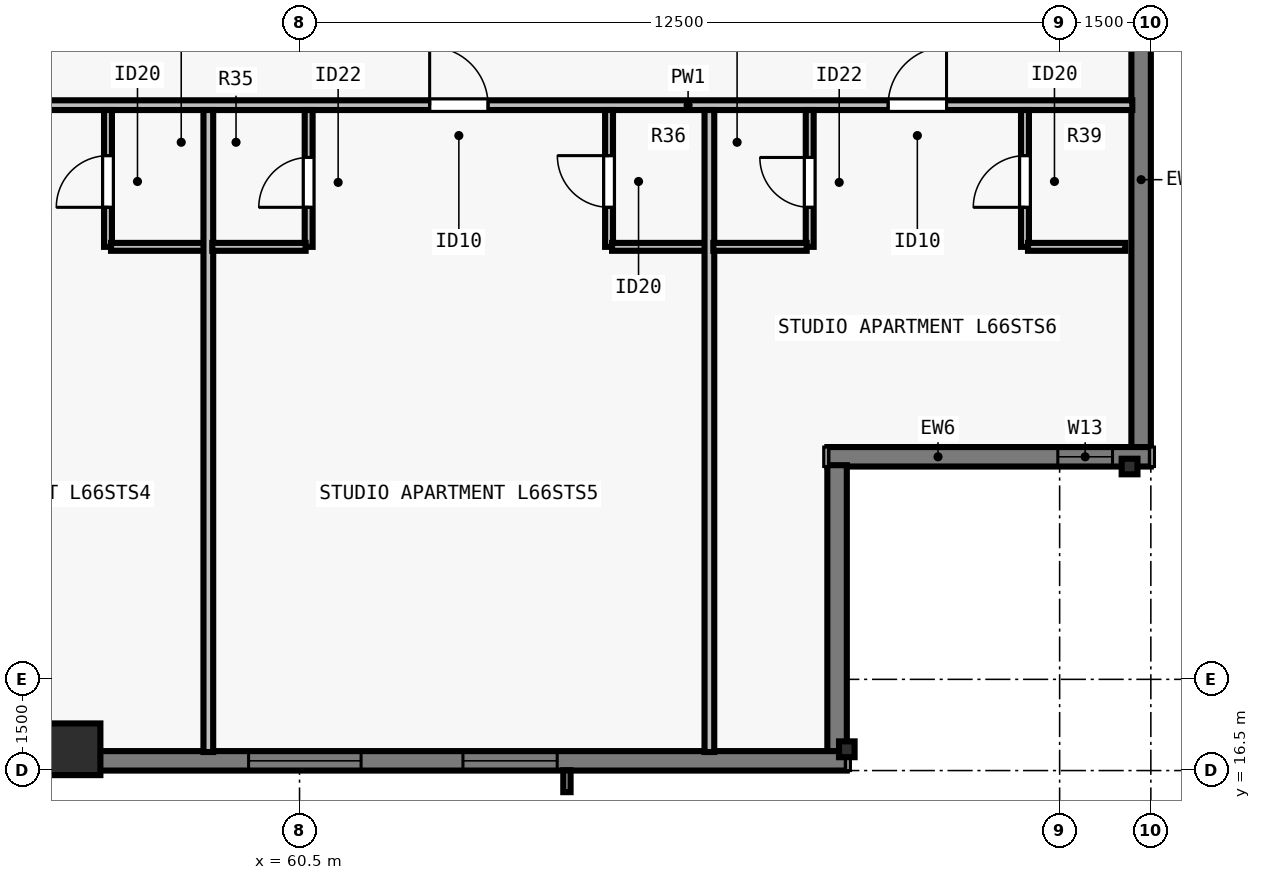
"""IFC4 building model, lengths in metres.
Left out: names, types, materials, properties, quantities, classifications, styles, units other than length and angle.
Written with IfcOpenShell. Run it as: python <this file> out.ifc"""

import sys

from ifc_helpers import new_model, si_unit, direction, frame, frame_2d, origin, origin_2d, place, context, subcontext, project, spatial, rectangle, i_section, extrude, element, fill, save


model = new_model("IFC4")
c1 = context("Model", 3, precision=1e-05, world=origin(), true_north=direction((0.0, 1.0)))
c2 = subcontext(c1, "Body", "Model", "MODEL_VIEW")
j1 = project(units=[si_unit("LENGTHUNIT", "METRE"), si_unit("PLANEANGLEUNIT", "RADIAN")], contexts=[c1])
p1 = place(None, origin())
s1 = spatial("IfcSite", under=j1, at=p1, CompositionType="ELEMENT")
p2 = place(p1, origin())
s2 = spatial("IfcBuilding", under=s1, at=p2, CompositionType="ELEMENT")
p3 = place(p2, frame((0.0, 0.0, 241.0)))
s3 = spatial("IfcBuildingStorey", under=s2, at=p3, CompositionType="ELEMENT", Elevation=241.0)
p4 = place(p3, frame((56.8, 16.85, 0.0), z_axis=(0.0, 0.0, 1.0), x_axis=(1.0, 0.0, 0.0)))
e1 = element("IfcColumn", 1, at=p4, inside=s3, PredefinedType="COLUMN", context=c2, shape_type="SweptSolid", body=[
    extrude(rectangle(XDim=0.85, YDim=0.85, at=origin_2d()), origin(), (0.0, 0.0, 1.0), 3.5),
])
for number, where, z_axis, x_axis in (
    (2, (69.5, 16.85, 0.0), (0.0, 0.0, 1.0), (1.0, 0.0, 0.0)),
    (3, (74.15, 21.5, 0.0), (0.0, 0.0, 1.0), (0.0, 1.0, 0.0)),
):
    element("IfcColumn", number, at=place(p3, frame(where, z_axis=z_axis, x_axis=x_axis)), inside=s3, PredefinedType="COLUMN", context=c2, shape_type="SweptSolid", body=[
        extrude(i_section(OverallWidth=0.256, OverallDepth=0.26, WebThickness=0.01, FlangeThickness=0.017, FilletRadius=0.013, at=origin_2d()), origin(), (0.0, 0.0, 1.0), 3.5),
    ])
p5 = place(p3, frame((74.34, 56.5, 0.0), z_axis=(0.0, 0.0, 1.0), x_axis=(0.0, -1.0, 0.0)))
e4 = element("IfcWall", 4, at=p5, inside=s3, PredefinedType="SOLIDWALL", context=c2, shape_type="SweptSolid", body=[
    extrude(rectangle(XDim=34.702, YDim=0.32, at=frame_2d((17.351, 0.0))), origin(), (0.0, 0.0, 1.0), 3.29),
])
p6 = place(p5, frame((3.913, 0.0, 0.8)))
e5 = element("IfcOpeningElement", 5, at=p6, cuts=e4, PredefinedType="OPENING", context=c2, shape_type="SweptSolid", body=[
    extrude(rectangle(XDim=1.55, YDim=1.678, at=frame_2d((0.775, 0.839))), frame((0.0, 0.17, 0.0), z_axis=(0.0, -1.0, 0.0), x_axis=(1.0, 0.0, 0.0)), (0.0, 0.0, 1.0), 0.34),
])
p7 = place(p5, frame((6.738, 0.0, 0.8)))
e6 = element("IfcOpeningElement", 6, at=p7, cuts=e4, PredefinedType="OPENING", context=c2, shape_type="SweptSolid", body=[
    extrude(rectangle(XDim=1.85, YDim=1.678, at=frame_2d((0.925, 0.839))), frame((0.0, 0.17, 0.0), z_axis=(0.0, -1.0, 0.0), x_axis=(1.0, 0.0, 0.0)), (0.0, 0.0, 1.0), 0.34),
])
p8 = place(p5, frame((10.263, 0.0, 0.8)))
e7 = element("IfcOpeningElement", 7, at=p8, cuts=e4, PredefinedType="OPENING", context=c2, shape_type="SweptSolid", body=[
    extrude(rectangle(XDim=1.55, YDim=1.678, at=frame_2d((0.775, 0.839))), frame((0.0, 0.17, 0.0), z_axis=(0.0, -1.0, 0.0), x_axis=(1.0, 0.0, 0.0)), (0.0, 0.0, 1.0), 0.34),
])
p9 = place(p5, frame((14.738, 0.0, 0.8)))
e8 = element("IfcOpeningElement", 8, at=p9, cuts=e4, PredefinedType="OPENING", context=c2, shape_type="SweptSolid", body=[
    extrude(rectangle(XDim=1.85, YDim=1.678, at=frame_2d((0.925, 0.839))), frame((0.0, 0.17, 0.0), z_axis=(0.0, -1.0, 0.0), x_axis=(1.0, 0.0, 0.0)), (0.0, 0.0, 1.0), 0.34),
])
p10 = place(p5, frame((18.264, 0.0, 0.8)))
e9 = element("IfcOpeningElement", 9, at=p10, cuts=e4, PredefinedType="OPENING", context=c2, shape_type="SweptSolid", body=[
    extrude(rectangle(XDim=1.55, YDim=1.678, at=frame_2d((0.775, 0.839))), frame((0.0, 0.17, 0.0), z_axis=(0.0, -1.0, 0.0), x_axis=(1.0, 0.0, 0.0)), (0.0, 0.0, 1.0), 0.34),
])
p11 = place(p5, frame((24.164, 0.0, 0.8)))
e10 = element("IfcOpeningElement", 10, at=p11, cuts=e4, PredefinedType="OPENING", context=c2, shape_type="SweptSolid", body=[
    extrude(rectangle(XDim=1.55, YDim=1.678, at=frame_2d((0.775, 0.839))), frame((0.0, 0.17, 0.0), z_axis=(0.0, -1.0, 0.0), x_axis=(1.0, 0.0, 0.0)), (0.0, 0.0, 1.0), 0.34),
])
p12 = place(p3, frame((74.5, 21.66, 0.0), z_axis=(0.0, 0.0, 1.0), x_axis=(-1.0, 0.0, 0.0)))
e11 = element("IfcWall", 11, at=p12, inside=s3, PredefinedType="SOLIDWALL", context=c2, shape_type="SweptSolid", body=[
    extrude(rectangle(XDim=5.32, YDim=0.32, at=frame_2d((2.66, 0.0))), origin(), (0.0, 0.0, 1.0), 3.29),
])
p13 = place(p12, frame((0.63, 0.0, 0.8)))
e12 = element("IfcOpeningElement", 12, at=p13, cuts=e11, PredefinedType="OPENING", context=c2, shape_type="SweptSolid", body=[
    extrude(rectangle(XDim=0.9, YDim=1.678, at=frame_2d((0.45, 0.839))), frame((0.0, 0.17, 0.0), z_axis=(0.0, -1.0, 0.0), x_axis=(1.0, 0.0, 0.0)), (0.0, 0.0, 1.0), 0.34),
])
p14 = place(p3, frame((69.34, 21.522, 0.0), z_axis=(0.0, 0.0, 1.0), x_axis=(0.0, -1.0, 0.0)))
e13 = element("IfcWall", 13, at=p14, inside=s3, PredefinedType="SOLIDWALL", context=c2, shape_type="SweptSolid", body=[
    extrude(rectangle(XDim=4.724, YDim=0.32, at=frame_2d((2.362, 0.0))), origin(), (0.0, 0.0, 1.0), 3.29),
])
p15 = place(p3, frame((69.5, 16.66, 0.0), z_axis=(0.0, 0.0, 1.0), x_axis=(-1.0, 0.0, 0.0)))
e14 = element("IfcWall", 14, at=p15, inside=s3, PredefinedType="SOLIDWALL", context=c2, shape_type="SweptSolid", body=[
    extrude(rectangle(XDim=34.702, YDim=0.32, at=frame_2d((17.351, 0.0))), origin(), (0.0, 0.0, 1.0), 3.29),
])
p16 = place(p15, frame((4.763, 0.0, 0.8)))
e15 = element("IfcOpeningElement", 15, at=p16, cuts=e14, PredefinedType="OPENING", context=c2, shape_type="SweptSolid", body=[
    extrude(rectangle(XDim=1.55, YDim=1.678, at=frame_2d((0.775, 0.839))), frame((0.0, 0.17, 0.0), z_axis=(0.0, -1.0, 0.0), x_axis=(1.0, 0.0, 0.0)), (0.0, 0.0, 1.0), 0.34),
])
p17 = place(p15, frame((7.988, 0.0, 0.8)))
e16 = element("IfcOpeningElement", 16, at=p17, cuts=e14, PredefinedType="OPENING", context=c2, shape_type="SweptSolid", body=[
    extrude(rectangle(XDim=1.85, YDim=1.678, at=frame_2d((0.925, 0.839))), frame((0.0, 0.17, 0.0), z_axis=(0.0, -1.0, 0.0), x_axis=(1.0, 0.0, 0.0)), (0.0, 0.0, 1.0), 0.34),
])
p18 = place(p15, frame((14.738, 0.0, 0.8)))
e17 = element("IfcOpeningElement", 17, at=p18, cuts=e14, PredefinedType="OPENING", context=c2, shape_type="SweptSolid", body=[
    extrude(rectangle(XDim=1.85, YDim=1.678, at=frame_2d((0.925, 0.839))), frame((0.0, 0.17, 0.0), z_axis=(0.0, -1.0, 0.0), x_axis=(1.0, 0.0, 0.0)), (0.0, 0.0, 1.0), 0.34),
])
p19 = place(p15, frame((18.264, 0.0, 0.8)))
e18 = element("IfcOpeningElement", 18, at=p19, cuts=e14, PredefinedType="OPENING", context=c2, shape_type="SweptSolid", body=[
    extrude(rectangle(XDim=1.55, YDim=1.678, at=frame_2d((0.775, 0.839))), frame((0.0, 0.17, 0.0), z_axis=(0.0, -1.0, 0.0), x_axis=(1.0, 0.0, 0.0)), (0.0, 0.0, 1.0), 0.34),
])
p20 = place(p15, frame((25.864, 0.0, 0.8)))
e19 = element("IfcOpeningElement", 19, at=p20, cuts=e14, PredefinedType="OPENING", context=c2, shape_type="SweptSolid", body=[
    extrude(rectangle(XDim=1.55, YDim=1.678, at=frame_2d((0.775, 0.839))), frame((0.0, 0.17, 0.0), z_axis=(0.0, -1.0, 0.0), x_axis=(1.0, 0.0, 0.0)), (0.0, 0.0, 1.0), 0.34),
])
p21 = place(p15, frame((28.24, 0.0, 0.8)))
e20 = element("IfcOpeningElement", 20, at=p21, cuts=e14, PredefinedType="OPENING", context=c2, shape_type="SweptSolid", body=[
    extrude(rectangle(XDim=1.85, YDim=1.678, at=frame_2d((0.925, 0.839))), frame((0.0, 0.17, 0.0), z_axis=(0.0, -1.0, 0.0), x_axis=(1.0, 0.0, 0.0)), (0.0, 0.0, 1.0), 0.34),
])
p22 = place(p3, frame((29.805, 27.442, 0.0), z_axis=(0.0, 0.0, 1.0), x_axis=(1.0, 0.0, 0.0)))
e21 = element("IfcWall", 21, at=p22, inside=s3, PredefinedType="PARTITIONING", context=c2, shape_type="SweptSolid", body=[
    extrude(rectangle(XDim=44.39, YDim=0.16, at=frame_2d((22.195, 0.0))), origin(), (0.0, 0.0, 1.0), 2.958),
])
p23 = place(p22, frame((3.575, 0.0, 0.0)))
e22 = element("IfcOpeningElement", 22, at=p23, cuts=e21, PredefinedType="OPENING", context=c2, shape_type="SweptSolid", body=[
    extrude(rectangle(XDim=0.96, YDim=2.18, at=frame_2d((0.48, 1.09))), frame((0.0, 0.09, 0.0), z_axis=(0.0, -1.0, 0.0), x_axis=(1.0, 0.0, 0.0)), (0.0, 0.0, 1.0), 0.18),
])
p24 = place(p22, frame((10.755, 0.0, 0.0)))
e23 = element("IfcOpeningElement", 23, at=p24, cuts=e21, PredefinedType="OPENING", context=c2, shape_type="SweptSolid", body=[
    extrude(rectangle(XDim=0.96, YDim=2.18, at=frame_2d((0.48, 1.09))), frame((0.0, 0.09, 0.0), z_axis=(0.0, -1.0, 0.0), x_axis=(1.0, 0.0, 0.0)), (0.0, 0.0, 1.0), 0.18),
])
p25 = place(p22, frame((18.115, 0.0, 0.0)))
e24 = element("IfcOpeningElement", 24, at=p25, cuts=e21, PredefinedType="OPENING", context=c2, shape_type="SweptSolid", body=[
    extrude(rectangle(XDim=0.96, YDim=2.18, at=frame_2d((0.48, 1.09))), frame((0.0, 0.09, 0.0), z_axis=(0.0, -1.0, 0.0), x_axis=(1.0, 0.0, 0.0)), (0.0, 0.0, 1.0), 0.18),
])
p26 = place(p22, frame((25.475, 0.0, 0.0)))
e25 = element("IfcOpeningElement", 25, at=p26, cuts=e21, PredefinedType="OPENING", context=c2, shape_type="SweptSolid", body=[
    extrude(rectangle(XDim=0.96, YDim=2.18, at=frame_2d((0.48, 1.09))), frame((0.0, 0.09, 0.0), z_axis=(0.0, -1.0, 0.0), x_axis=(1.0, 0.0, 0.0)), (0.0, 0.0, 1.0), 0.18),
])
p27 = place(p22, frame((32.835, 0.0, 0.0)))
e26 = element("IfcOpeningElement", 26, at=p27, cuts=e21, PredefinedType="OPENING", context=c2, shape_type="SweptSolid", body=[
    extrude(rectangle(XDim=0.96, YDim=2.18, at=frame_2d((0.48, 1.09))), frame((0.0, 0.09, 0.0), z_axis=(0.0, -1.0, 0.0), x_axis=(1.0, 0.0, 0.0)), (0.0, 0.0, 1.0), 0.18),
])
p28 = place(p22, frame((40.375, 0.0, 0.0)))
e27 = element("IfcOpeningElement", 27, at=p28, cuts=e21, PredefinedType="OPENING", context=c2, shape_type="SweptSolid", body=[
    extrude(rectangle(XDim=0.96, YDim=2.18, at=frame_2d((0.48, 1.09))), frame((0.0, 0.09, 0.0), z_axis=(0.0, -1.0, 0.0), x_axis=(1.0, 0.0, 0.0)), (0.0, 0.0, 1.0), 0.18),
])
p29 = place(p3, frame((57.35, 25.113, 0.0), z_axis=(0.0, 0.0, 1.0), x_axis=(0.0, 1.0, 0.0)))
e28 = element("IfcWall", 28, at=p29, inside=s3, PredefinedType="PLUMBINGWALL", context=c2, shape_type="SweptSolid", body=[
    extrude(rectangle(XDim=2.25, YDim=0.13, at=frame_2d((1.125, 0.0))), origin(), (0.0, 0.0, 1.0), 3.29),
])
p30 = place(p29, frame((0.65, 0.0, 0.0)))
e29 = element("IfcOpeningElement", 29, at=p30, cuts=e28, PredefinedType="OPENING", context=c2, shape_type="SweptSolid", body=[
    extrude(rectangle(XDim=0.85, YDim=2.1, at=frame_2d((0.425, 1.05))), frame((0.0, 0.075, 0.0), z_axis=(0.0, -1.0, 0.0), x_axis=(1.0, 0.0, 0.0)), (0.0, 0.0, 1.0), 0.15),
])
p31 = place(p3, frame((57.4, 25.113, 0.0), z_axis=(0.0, 0.0, 1.0), x_axis=(1.0, 0.0, 0.0)))
e30 = element("IfcWall", 30, at=p31, inside=s3, PredefinedType="PLUMBINGWALL", context=c2, shape_type="SweptSolid", body=[
    extrude(rectangle(XDim=1.6, YDim=0.13, at=frame_2d((0.8, 0.0))), origin(), (0.0, 0.0, 1.0), 3.29),
])
p32 = place(p3, frame((59.0, 16.805, 0.0), z_axis=(0.0, 0.0, 1.0), x_axis=(0.0, 1.0, 0.0)))
e31 = element("IfcWall", 31, at=p32, inside=s3, PredefinedType="PARTITIONING", context=c2, shape_type="SweptSolid", body=[
    extrude(rectangle(XDim=10.558, YDim=0.16, at=frame_2d((5.279, 0.0))), origin(), (0.0, 0.0, 1.0), 3.29),
])
p33 = place(p3, frame((60.65, 25.113, 0.0), z_axis=(0.0, 0.0, 1.0), x_axis=(0.0, 1.0, 0.0)))
e32 = element("IfcWall", 32, at=p33, inside=s3, PredefinedType="PLUMBINGWALL", context=c2, shape_type="SweptSolid", body=[
    extrude(rectangle(XDim=2.25, YDim=0.13, at=frame_2d((1.125, 0.0))), origin(), (0.0, 0.0, 1.0), 3.29),
])
p34 = place(p33, frame((0.65, 0.0, 0.0)))
e33 = element("IfcOpeningElement", 33, at=p34, cuts=e32, PredefinedType="OPENING", context=c2, shape_type="SweptSolid", body=[
    extrude(rectangle(XDim=0.82, YDim=2.1, at=frame_2d((0.41, 1.05))), frame((0.0, 0.075, 0.0), z_axis=(0.0, -1.0, 0.0), x_axis=(1.0, 0.0, 0.0)), (0.0, 0.0, 1.0), 0.15),
])
p35 = place(p3, frame((59.065, 25.113, 0.0), z_axis=(0.0, 0.0, 1.0), x_axis=(1.0, 0.0, 0.0)))
e34 = element("IfcWall", 34, at=p35, inside=s3, PredefinedType="PLUMBINGWALL", context=c2, shape_type="SweptSolid", body=[
    extrude(rectangle(XDim=1.535, YDim=0.13, at=frame_2d((0.768, 0.0))), origin(), (0.0, 0.0, 1.0), 3.29),
])
p36 = place(p3, frame((65.59, 25.113, 0.0), z_axis=(0.0, 0.0, 1.0), x_axis=(0.0, 1.0, 0.0)))
e35 = element("IfcWall", 35, at=p36, inside=s3, PredefinedType="PLUMBINGWALL", context=c2, shape_type="SweptSolid", body=[
    extrude(rectangle(XDim=2.25, YDim=0.13, at=frame_2d((1.125, 0.0))), origin(), (0.0, 0.0, 1.0), 3.29),
])
p37 = place(p36, frame((0.65, 0.0, 0.0)))
e36 = element("IfcOpeningElement", 36, at=p37, cuts=e35, PredefinedType="OPENING", context=c2, shape_type="SweptSolid", body=[
    extrude(rectangle(XDim=0.85, YDim=2.1, at=frame_2d((0.425, 1.05))), frame((0.0, 0.075, 0.0), z_axis=(0.0, -1.0, 0.0), x_axis=(1.0, 0.0, 0.0)), (0.0, 0.0, 1.0), 0.15),
])
p38 = place(p3, frame((65.64, 25.113, 0.0), z_axis=(0.0, 0.0, 1.0), x_axis=(1.0, 0.0, 0.0)))
e37 = element("IfcWall", 37, at=p38, inside=s3, PredefinedType="PLUMBINGWALL", context=c2, shape_type="SweptSolid", body=[
    extrude(rectangle(XDim=1.6, YDim=0.13, at=frame_2d((0.8, 0.0))), origin(), (0.0, 0.0, 1.0), 3.29),
])
p39 = place(p3, frame((67.24, 16.805, 0.0), z_axis=(0.0, 0.0, 1.0), x_axis=(0.0, 1.0, 0.0)))
e38 = element("IfcWall", 38, at=p39, inside=s3, PredefinedType="PARTITIONING", context=c2, shape_type="SweptSolid", body=[
    extrude(rectangle(XDim=10.558, YDim=0.16, at=frame_2d((5.279, 0.0))), origin(), (0.0, 0.0, 1.0), 2.573),
])
p40 = place(p3, frame((68.89, 25.113, 0.0), z_axis=(0.0, 0.0, 1.0), x_axis=(0.0, 1.0, 0.0)))
e39 = element("IfcWall", 39, at=p40, inside=s3, PredefinedType="PLUMBINGWALL", context=c2, shape_type="SweptSolid", body=[
    extrude(rectangle(XDim=2.25, YDim=0.13, at=frame_2d((1.125, 0.0))), origin(), (0.0, 0.0, 1.0), 3.29),
])
p41 = place(p40, frame((0.65, 0.0, 0.0)))
e40 = element("IfcOpeningElement", 40, at=p41, cuts=e39, PredefinedType="OPENING", context=c2, shape_type="SweptSolid", body=[
    extrude(rectangle(XDim=0.82, YDim=2.1, at=frame_2d((0.41, 1.05))), frame((0.0, 0.075, 0.0), z_axis=(0.0, -1.0, 0.0), x_axis=(1.0, 0.0, 0.0)), (0.0, 0.0, 1.0), 0.15),
])
p42 = place(p3, frame((67.305, 25.113, 0.0), z_axis=(0.0, 0.0, 1.0), x_axis=(1.0, 0.0, 0.0)))
e41 = element("IfcWall", 41, at=p42, inside=s3, PredefinedType="PLUMBINGWALL", context=c2, shape_type="SweptSolid", body=[
    extrude(rectangle(XDim=1.535, YDim=0.13, at=frame_2d((0.768, 0.0))), origin(), (0.0, 0.0, 1.0), 2.958),
])
p43 = place(p3, frame((72.43, 25.113, 0.0), z_axis=(0.0, 0.0, 1.0), x_axis=(0.0, 1.0, 0.0)))
e42 = element("IfcWall", 42, at=p43, inside=s3, PredefinedType="PLUMBINGWALL", context=c2, shape_type="SweptSolid", body=[
    extrude(rectangle(XDim=2.25, YDim=0.13, at=frame_2d((1.125, 0.0))), origin(), (0.0, 0.0, 1.0), 3.29),
])
p44 = place(p43, frame((0.65, 0.0, 0.0)))
e43 = element("IfcOpeningElement", 43, at=p44, cuts=e42, PredefinedType="OPENING", context=c2, shape_type="SweptSolid", body=[
    extrude(rectangle(XDim=0.85, YDim=2.1, at=frame_2d((0.425, 1.05))), frame((0.0, 0.075, 0.0), z_axis=(0.0, -1.0, 0.0), x_axis=(1.0, 0.0, 0.0)), (0.0, 0.0, 1.0), 0.15),
])
p45 = place(p3, frame((72.48, 25.113, 0.0), z_axis=(0.0, 0.0, 1.0), x_axis=(1.0, 0.0, 0.0)))
e44 = element("IfcWall", 44, at=p45, inside=s3, PredefinedType="PLUMBINGWALL", context=c2, shape_type="SweptSolid", body=[
    extrude(rectangle(XDim=1.6, YDim=0.13, at=frame_2d((0.8, 0.0))), origin(), (0.0, 0.0, 1.0), 3.29),
])
p46 = place(p16, origin())
e45 = element("IfcWindow", 45, at=p46, inside=s3, PartitioningType="SINGLE_PANEL", PredefinedType="WINDOW", context=c2, shape_type="SweptSolid", body=[
    extrude(rectangle(XDim=1.55, YDim=1.678, at=frame_2d((0.775, 0.839))), frame((0.0, -0.05, 0.0), z_axis=(0.0, -1.0, 0.0), x_axis=(1.0, 0.0, 0.0)), (0.0, 0.0, 1.0), 0.06),
])
fill(e15, e45)
p47 = place(p17, origin())
e46 = element("IfcWindow", 46, at=p47, inside=s3, PartitioningType="SINGLE_PANEL", PredefinedType="WINDOW", context=c2, shape_type="SweptSolid", body=[
    extrude(rectangle(XDim=1.85, YDim=1.678, at=frame_2d((0.925, 0.839))), frame((0.0, -0.05, 0.0), z_axis=(0.0, -1.0, 0.0), x_axis=(1.0, 0.0, 0.0)), (0.0, 0.0, 1.0), 0.06),
])
fill(e16, e46)
p48 = place(p13, origin())
e47 = element("IfcWindow", 47, at=p48, inside=s3, PartitioningType="SINGLE_PANEL", PredefinedType="WINDOW", context=c2, shape_type="SweptSolid", body=[
    extrude(rectangle(XDim=0.9, YDim=1.678, at=frame_2d((0.45, 0.839))), frame((0.0, -0.04, 0.0), z_axis=(0.0, -1.0, 0.0), x_axis=(1.0, 0.0, 0.0)), (0.0, 0.0, 1.0), 0.06),
])
fill(e12, e47)
p49 = place(p30, origin())
e48 = element("IfcDoor", 48, at=p49, inside=s3, OperationType="SINGLE_SWING_LEFT", PredefinedType="DOOR", context=c2, shape_type="SweptSolid", body=[
    extrude(rectangle(XDim=0.85, YDim=2.1, at=frame_2d((0.425, 1.05))), frame((0.0, 0.025, 0.0), z_axis=(0.0, -1.0, 0.0), x_axis=(1.0, 0.0, 0.0)), (0.0, 0.0, 1.0), 0.05),
])
fill(e29, e48)
p50 = place(p34, origin())
e49 = element("IfcDoor", 49, at=p50, inside=s3, OperationType="SINGLE_SWING_LEFT", PredefinedType="DOOR", context=c2, shape_type="SweptSolid", body=[
    extrude(rectangle(XDim=0.82, YDim=2.1, at=frame_2d((0.41, 1.05))), frame((0.0, 0.025, 0.0), z_axis=(0.0, -1.0, 0.0), x_axis=(1.0, 0.0, 0.0)), (0.0, 0.0, 1.0), 0.05),
])
fill(e33, e49)
p51 = place(p37, origin())
e50 = element("IfcDoor", 50, at=p51, inside=s3, OperationType="SINGLE_SWING_RIGHT", PredefinedType="DOOR", context=c2, shape_type="SweptSolid", body=[
    extrude(rectangle(XDim=0.85, YDim=2.1, at=frame_2d((0.425, 1.05))), frame((0.0, 0.025, 0.0), z_axis=(0.0, -1.0, 0.0), x_axis=(1.0, 0.0, 0.0)), (0.0, 0.0, 1.0), 0.05),
])
fill(e36, e50)
p52 = place(p27, origin())
e51 = element("IfcDoor", 51, at=p52, inside=s3, OperationType="SINGLE_SWING_LEFT", PredefinedType="DOOR", context=c2, shape_type="SweptSolid", body=[
    extrude(rectangle(XDim=0.96, YDim=2.18, at=frame_2d((0.48, 1.09))), frame((0.0, 0.025, 0.0), z_axis=(0.0, -1.0, 0.0), x_axis=(1.0, 0.0, 0.0)), (0.0, 0.0, 1.0), 0.05),
])
fill(e26, e51)
p53 = place(p41, origin())
e52 = element("IfcDoor", 52, at=p53, inside=s3, OperationType="SINGLE_SWING_RIGHT", PredefinedType="DOOR", context=c2, shape_type="SweptSolid", body=[
    extrude(rectangle(XDim=0.82, YDim=2.1, at=frame_2d((0.41, 1.05))), frame((0.0, 0.025, 0.0), z_axis=(0.0, -1.0, 0.0), x_axis=(1.0, 0.0, 0.0)), (0.0, 0.0, 1.0), 0.05),
])
fill(e40, e52)
p54 = place(p44, origin())
e53 = element("IfcDoor", 53, at=p54, inside=s3, OperationType="SINGLE_SWING_LEFT", PredefinedType="DOOR", context=c2, shape_type="SweptSolid", body=[
    extrude(rectangle(XDim=0.85, YDim=2.1, at=frame_2d((0.425, 1.05))), frame((0.0, 0.025, 0.0), z_axis=(0.0, -1.0, 0.0), x_axis=(1.0, 0.0, 0.0)), (0.0, 0.0, 1.0), 0.05),
])
fill(e43, e53)
p55 = place(p28, origin())
e54 = element("IfcDoor", 54, at=p55, inside=s3, OperationType="SINGLE_SWING_RIGHT", PredefinedType="DOOR", context=c2, shape_type="SweptSolid", body=[
    extrude(rectangle(XDim=0.96, YDim=2.18, at=frame_2d((0.48, 1.09))), frame((0.0, 0.025, 0.0), z_axis=(0.0, -1.0, 0.0), x_axis=(1.0, 0.0, 0.0)), (0.0, 0.0, 1.0), 0.05),
])
fill(e27, e54)
save(model, sys.argv[1])
